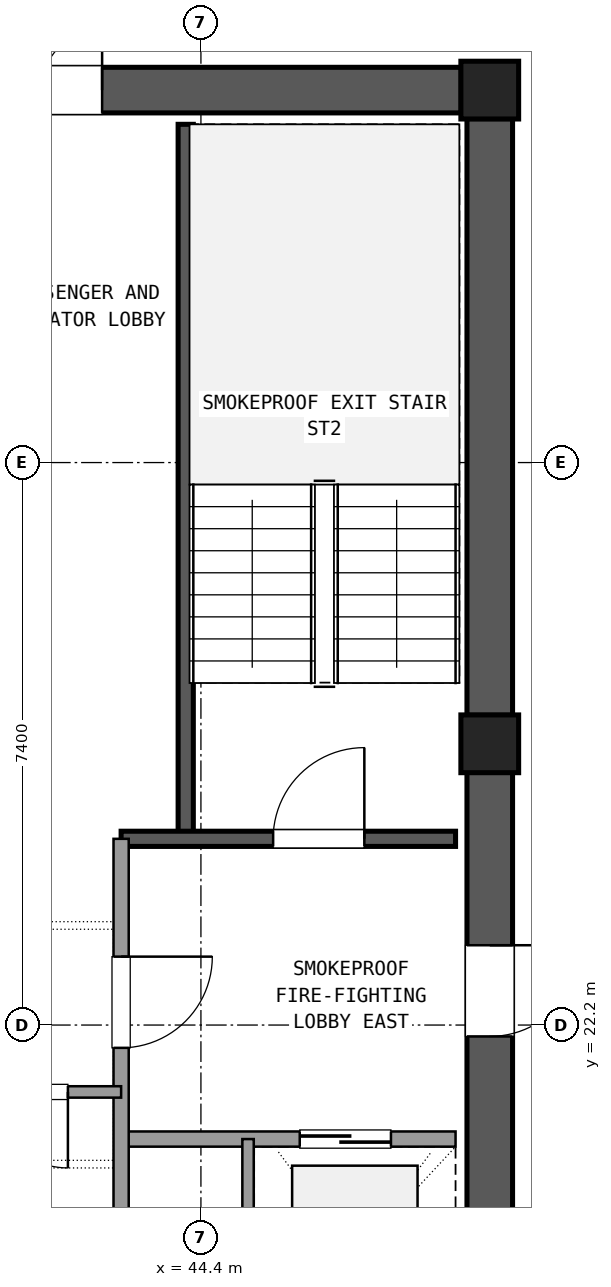
"""IFC4 building model, lengths in metres.
Left out: names, types, materials, properties, quantities, classifications, styles, units other than length and angle.
Written with IfcOpenShell. Run it as: python <this file> out.ifc"""

import sys

from ifc_helpers import new_model, si_unit, direction, frame, frame_2d, origin, origin_2d, place, context, subcontext, project, spatial, rectangle, extrude, element, fill, save


model = new_model("IFC4")
c1 = context("Model", 3, precision=1e-05, world=origin(), true_north=direction((0.0, 1.0)))
c2 = subcontext(c1, "Body", "Model", "MODEL_VIEW")
j1 = project(units=[si_unit("LENGTHUNIT", "METRE"), si_unit("PLANEANGLEUNIT", "RADIAN")], contexts=[c1])
p1 = place(None, origin())
s1 = spatial("IfcSite", under=j1, at=p1, CompositionType="ELEMENT")
p2 = place(p1, origin())
s2 = spatial("IfcBuilding", under=s1, at=p2, CompositionType="ELEMENT")
p3 = place(p2, frame((0.0, 0.0, 282.42)))
s3 = spatial("IfcBuildingStorey", under=s2, at=p3, CompositionType="ELEMENT", Elevation=282.42)
for number, where, z_axis, x_axis in (
    (1, (48.2, 25.9, 0.0), (0.0, 0.0, 1.0), (1.0, 0.0, 0.0)),
    (2, (48.2, 34.5, 0.0), (0.0, 0.0, 1.0), (1.0, 0.0, 0.0)),
):
    element("IfcColumn", number, at=place(p3, frame(where, z_axis=z_axis, x_axis=x_axis)), inside=s3, PredefinedType="COLUMN", context=c2, shape_type="SweptSolid", body=[
        extrude(rectangle(XDim=0.76, YDim=0.76, at=origin_2d()), origin(), (0.0, 0.0, 1.0), 3.6),
    ])
p4 = place(p3, frame((48.2, 17.675, 0.0), z_axis=(0.0, 0.0, 1.0), x_axis=(0.0, 1.0, 0.0)))
e3 = element("IfcWall", 3, at=p4, inside=s3, PredefinedType="SHEAR", context=c2, shape_type="SweptSolid", body=[
    extrude(rectangle(XDim=7.85, YDim=0.6, at=frame_2d((3.925, 0.0))), origin(), (0.0, 0.0, 1.0), 3.32),
])
p5 = place(p4, frame((4.375, 0.0, 0.0)))
e4 = element("IfcOpeningElement", 4, at=p5, cuts=e3, PredefinedType="OPENING", context=c2, shape_type="SweptSolid", body=[
    extrude(rectangle(XDim=1.2, YDim=2.15, at=frame_2d((0.6, 1.075))), frame((0.0, 0.31, 0.0), z_axis=(0.0, -1.0, 0.0), x_axis=(1.0, 0.0, 0.0)), (0.0, 0.0, 1.0), 0.62),
])
p6 = place(p3, frame((48.2, 26.275, 0.0), z_axis=(0.0, 0.0, 1.0), x_axis=(0.0, 1.0, 0.0)))
e5 = element("IfcWall", 5, at=p6, inside=s3, PredefinedType="SHEAR", context=c2, shape_type="SweptSolid", body=[
    extrude(rectangle(XDim=7.85, YDim=0.6, at=frame_2d((3.925, 0.0))), origin(), (0.0, 0.0, 1.0), 3.32),
])
p7 = place(p3, frame((47.825, 34.5, 0.0), z_axis=(0.0, 0.0, 1.0), x_axis=(-1.0, 0.0, 0.0)))
e6 = element("IfcWall", 6, at=p7, inside=s3, PredefinedType="SHEAR", context=c2, shape_type="SweptSolid", body=[
    extrude(rectangle(XDim=10.45, YDim=0.6, at=frame_2d((5.225, 0.0))), origin(), (0.0, 0.0, 1.0), 3.32),
])
p8 = place(p7, frame((4.725, 0.0, 0.0)))
e7 = element("IfcOpeningElement", 7, at=p8, cuts=e6, PredefinedType="OPENING", context=c2, shape_type="SweptSolid", body=[
    extrude(rectangle(XDim=1.6, YDim=2.2, at=frame_2d((0.8, 1.1))), frame((0.0, 0.31, 0.0), z_axis=(0.0, -1.0, 0.0), x_axis=(1.0, 0.0, 0.0)), (0.0, 0.0, 1.0), 0.62),
])
p9 = place(p3, frame((44.2, 24.65, 0.0), z_axis=(0.0, 0.0, 1.0), x_axis=(0.0, 1.0, 0.0)))
e8 = element("IfcWall", 8, at=p9, inside=s3, PredefinedType="SHEAR", context=c2, shape_type="SweptSolid", body=[
    extrude(rectangle(XDim=9.4, YDim=0.2, at=frame_2d((4.7, 0.0))), origin(), (0.0, 0.0, 1.0), 3.32),
])
p10 = place(p3, frame((43.35, 24.65, 0.0), z_axis=(0.0, 0.0, 1.0), x_axis=(1.0, 0.0, 0.0)))
e9 = element("IfcWall", 9, at=p10, inside=s3, PredefinedType="SHEAR", context=c2, shape_type="SweptSolid", body=[
    extrude(rectangle(XDim=4.4, YDim=0.2, at=frame_2d((2.2, 0.0))), origin(), (0.0, 0.0, 1.0), 3.32),
])
p11 = place(p10, frame((2.0, 0.0, 0.0)))
e10 = element("IfcOpeningElement", 10, at=p11, cuts=e9, PredefinedType="OPENING", context=c2, shape_type="SweptSolid", body=[
    extrude(rectangle(XDim=1.2, YDim=2.15, at=frame_2d((0.6, 1.075))), frame((0.0, 0.11, 0.0), z_axis=(0.0, -1.0, 0.0), x_axis=(1.0, 0.0, 0.0)), (0.0, 0.0, 1.0), 0.22),
])
p12 = place(p3, frame((43.35, 20.7, 0.0), z_axis=(0.0, 0.0, 1.0), x_axis=(1.0, 0.0, 0.0)))
e11 = element("IfcWall", 11, at=p12, inside=s3, PredefinedType="SOLIDWALL", context=c2, shape_type="SweptSolid", body=[
    extrude(rectangle(XDim=4.4, YDim=0.2, at=frame_2d((2.2, 0.0))), origin(), (0.0, 0.0, 1.0), 2.24),
])
p13 = place(p12, frame((2.35, 0.0, 0.0)))
e12 = element("IfcOpeningElement", 12, at=p13, cuts=e11, PredefinedType="OPENING", context=c2, shape_type="SweptSolid", body=[
    extrude(rectangle(XDim=1.2, YDim=2.15, at=frame_2d((0.6, 1.075))), frame((0.0, 0.11, 0.0), z_axis=(0.0, -1.0, 0.0), x_axis=(1.0, 0.0, 0.0)), (0.0, 0.0, 1.0), 0.22),
])
p14 = place(p3, frame((43.35, 17.75, 0.0), z_axis=(0.0, 0.0, 1.0), x_axis=(0.0, 1.0, 0.0)))
e13 = element("IfcWall", 13, at=p14, inside=s3, PredefinedType="SOLIDWALL", context=c2, shape_type="SweptSolid", body=[
    extrude(rectangle(XDim=6.9, YDim=0.2, at=frame_2d((3.45, 0.0))), origin(), (0.0, 0.0, 1.0), 2.24),
])
p15 = place(p14, frame((4.15, 0.0, 0.0)))
e14 = element("IfcOpeningElement", 14, at=p15, cuts=e13, PredefinedType="OPENING", context=c2, shape_type="SweptSolid", body=[
    extrude(rectangle(XDim=1.2, YDim=2.15, at=frame_2d((0.6, 1.075))), frame((0.0, 0.11, 0.0), z_axis=(0.0, -1.0, 0.0), x_axis=(1.0, 0.0, 0.0)), (0.0, 0.0, 1.0), 0.22),
])
p16 = place(p3, frame((45.02, 17.75, 0.0), z_axis=(0.0, 0.0, 1.0), x_axis=(0.0, 1.0, 0.0)))
e15 = element("IfcWall", 15, at=p16, inside=s3, PredefinedType="PARTITIONING", context=c2, shape_type="SweptSolid", body=[
    extrude(rectangle(XDim=2.95, YDim=0.15, at=frame_2d((1.475, 0.0))), origin(), (0.0, 0.0, 1.0), 2.24),
])
p17 = place(p3, frame((37.25, 21.32, 0.0), z_axis=(0.0, 0.0, 1.0), x_axis=(1.0, 0.0, 0.0)))
e16 = element("IfcWall", 16, at=p17, inside=s3, PredefinedType="PARTITIONING", context=c2, shape_type="SweptSolid", body=[
    extrude(rectangle(XDim=6.1, YDim=0.15, at=frame_2d((3.05, 0.0))), origin(), (0.0, 0.0, 1.0), 2.24),
])
p18 = place(p17, frame((0.55, 0.0, 0.0)))
e17 = element("IfcOpeningElement", 17, at=p18, cuts=e16, PredefinedType="OPENING", context=c2, shape_type="SweptSolid", body=[
    extrude(rectangle(XDim=1.0, YDim=2.15, at=frame_2d((0.5, 1.075))), frame((0.0, 0.085, 0.0), z_axis=(0.0, -1.0, 0.0), x_axis=(1.0, 0.0, 0.0)), (0.0, 0.0, 1.0), 0.17),
])
p19 = place(p17, frame((4.4, 0.0, 0.0)))
e18 = element("IfcOpeningElement", 18, at=p19, cuts=e16, PredefinedType="OPENING", context=c2, shape_type="SweptSolid", body=[
    extrude(rectangle(XDim=1.0, YDim=2.15, at=frame_2d((0.5, 1.075))), frame((0.0, 0.085, 0.0), z_axis=(0.0, -1.0, 0.0), x_axis=(1.0, 0.0, 0.0)), (0.0, 0.0, 1.0), 0.17),
])
p20 = place(p11, origin())
e19 = element("IfcDoor", 19, at=p20, inside=s3, OperationType="SINGLE_SWING_RIGHT", PredefinedType="DOOR", context=c2, shape_type="SweptSolid", body=[
    extrude(rectangle(XDim=1.2, YDim=2.15, at=frame_2d((0.6, 1.075))), frame((0.0, 0.025, 0.0), z_axis=(0.0, -1.0, 0.0), x_axis=(1.0, 0.0, 0.0)), (0.0, 0.0, 1.0), 0.05),
])
fill(e10, e19)
p21 = place(p13, origin())
e20 = element("IfcDoor", 20, at=p21, inside=s3, OperationType="SLIDING_TO_RIGHT", PredefinedType="DOOR", context=c2, shape_type="SweptSolid", body=[
    extrude(rectangle(XDim=1.2, YDim=2.15, at=frame_2d((0.6, 1.075))), frame((0.0, 0.025, 0.0), z_axis=(0.0, -1.0, 0.0), x_axis=(1.0, 0.0, 0.0)), (0.0, 0.0, 1.0), 0.05),
])
fill(e12, e20)
p22 = place(p15, frame((1.2, 0.0, 0.0), z_axis=(0.0, 0.0, 1.0), x_axis=(-1.0, 0.0, 0.0)))
e21 = element("IfcDoor", 21, at=p22, inside=s3, OperationType="SINGLE_SWING_RIGHT", PredefinedType="DOOR", context=c2, shape_type="SweptSolid", body=[
    extrude(rectangle(XDim=1.2, YDim=2.15, at=frame_2d((0.6, 1.075))), frame((0.0, 0.025, 0.0), z_axis=(0.0, -1.0, 0.0), x_axis=(1.0, 0.0, 0.0)), (0.0, 0.0, 1.0), 0.05),
])
fill(e14, e21)
p23 = place(p5, frame((1.2, 0.0, 0.0), z_axis=(0.0, 0.0, 1.0), x_axis=(-1.0, 0.0, 0.0)))
e22 = element("IfcDoor", 22, at=p23, inside=s3, OperationType="SINGLE_SWING_RIGHT", PredefinedType="DOOR", context=c2, shape_type="SweptSolid", body=[
    extrude(rectangle(XDim=1.2, YDim=2.15, at=frame_2d((0.6, 1.075))), frame((0.0, 0.025, 0.0), z_axis=(0.0, -1.0, 0.0), x_axis=(1.0, 0.0, 0.0)), (0.0, 0.0, 1.0), 0.05),
])
fill(e4, e22)
p24 = place(p8, frame((1.6, 0.0, 0.0), z_axis=(0.0, 0.0, 1.0), x_axis=(-1.0, 0.0, 0.0)))
e23 = element("IfcDoor", 23, at=p24, inside=s3, OperationType="DOUBLE_DOOR_SINGLE_SWING", PredefinedType="DOOR", context=c2, shape_type="SweptSolid", body=[
    extrude(rectangle(XDim=1.6, YDim=2.2, at=frame_2d((0.8, 1.1))), frame((0.0, 0.025, 0.0), z_axis=(0.0, -1.0, 0.0), x_axis=(1.0, 0.0, 0.0)), (0.0, 0.0, 1.0), 0.05),
])
fill(e7, e23)
p25 = place(p19, frame((1.0, 0.0, 0.0), z_axis=(0.0, 0.0, 1.0), x_axis=(-1.0, 0.0, 0.0)))
e24 = element("IfcDoor", 24, at=p25, inside=s3, OperationType="SINGLE_SWING_RIGHT", PredefinedType="DOOR", context=c2, shape_type="SweptSolid", body=[
    extrude(rectangle(XDim=1.0, YDim=2.15, at=frame_2d((0.5, 1.075))), frame((0.0, 0.025, 0.0), z_axis=(0.0, -1.0, 0.0), x_axis=(1.0, 0.0, 0.0)), (0.0, 0.0, 1.0), 0.05),
])
fill(e18, e24)
save(model, sys.argv[1])
